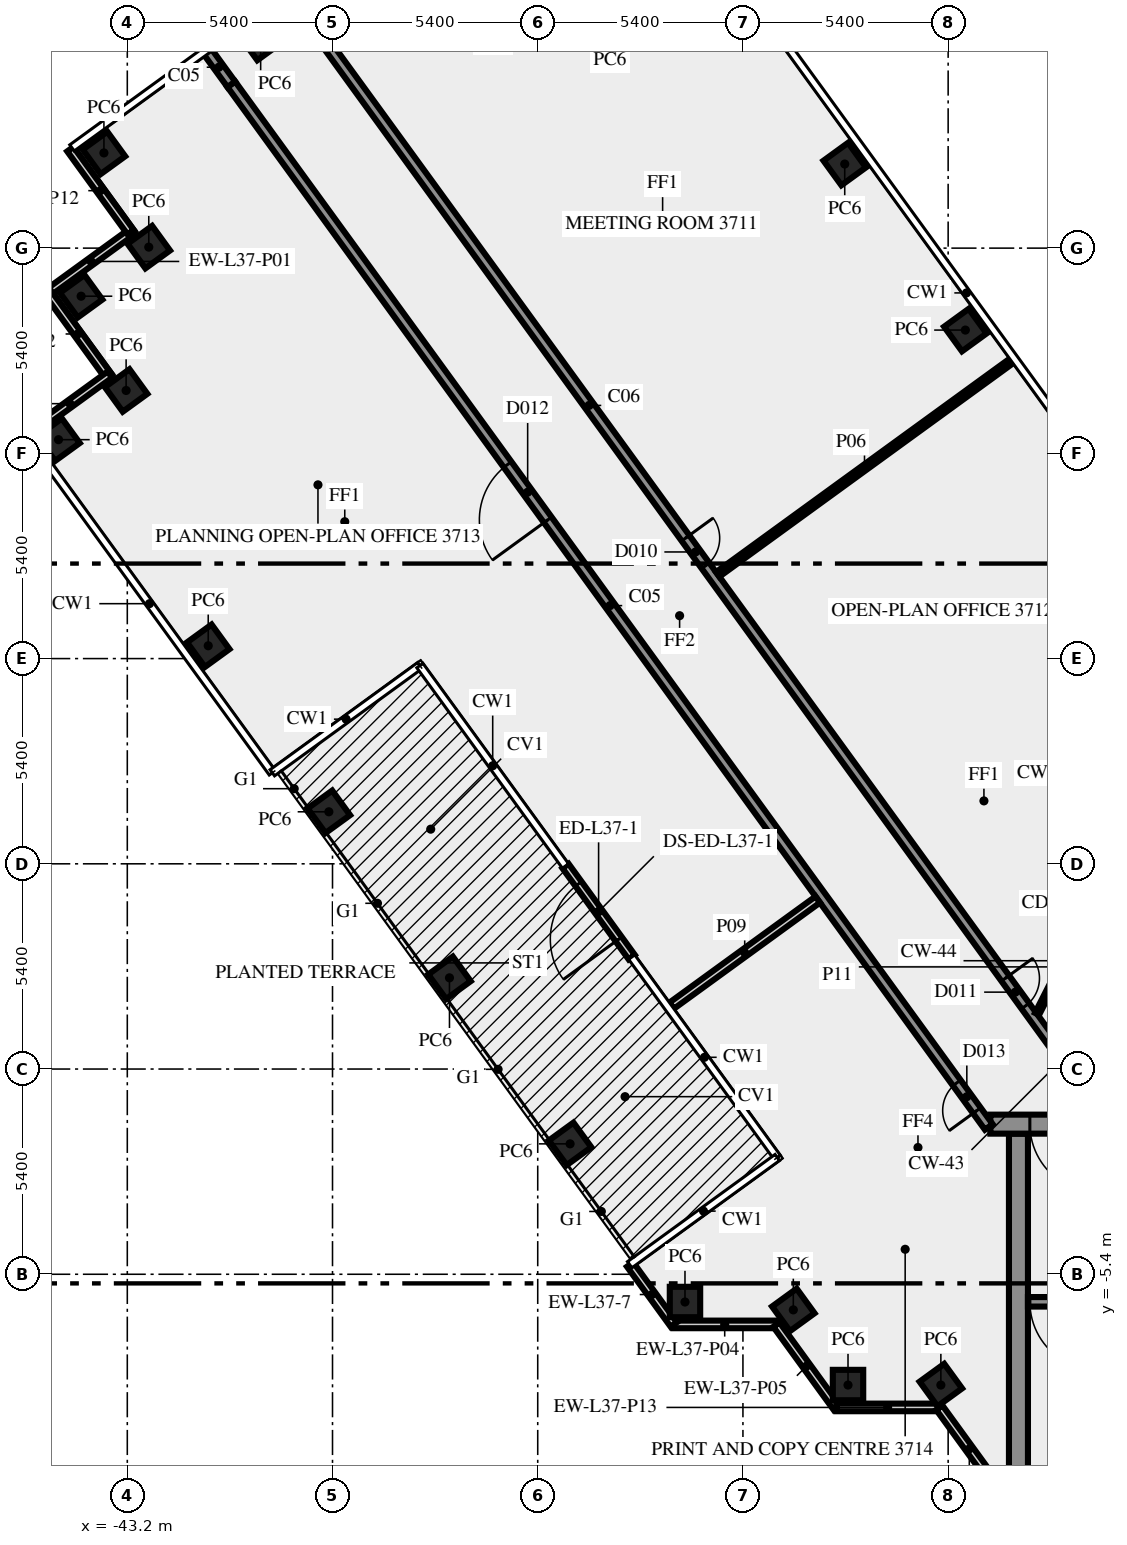
"""IFC4 building model, lengths in metres.
Left out: names, types, materials, properties, quantities, classifications, styles, units other than length and angle.
Written with IfcOpenShell. Run it as: python <this file> out.ifc"""

import sys

from ifc_helpers import new_model, si_unit, direction, frame, frame_2d, origin, origin_2d, place, context, subcontext, project, spatial, rectangle, extrude, element, fill, save


model = new_model("IFC4")
c1 = context("Model", 3, precision=1e-05, world=origin(), true_north=direction((0.0, 1.0)))
c2 = subcontext(c1, "Body", "Model", "MODEL_VIEW")
j1 = project(units=[si_unit("LENGTHUNIT", "METRE"), si_unit("PLANEANGLEUNIT", "RADIAN")], contexts=[c1])
p1 = place(None, origin())
s1 = spatial("IfcSite", under=j1, at=p1, CompositionType="ELEMENT")
p2 = place(p1, origin())
s2 = spatial("IfcBuilding", under=s1, at=p2, CompositionType="ELEMENT")
p3 = place(p2, frame((0.0, 0.0, 160.0)))
s3 = spatial("IfcBuildingStorey", under=s2, at=p3, CompositionType="ELEMENT", Elevation=160.0)
for number, where, z_axis, x_axis in (
    (1, (-21.147, 19.444, 0.0), (0.0, 0.0, 1.0), (-0.588, 0.809, 0.0)),
    (2, (-24.321, 23.812, 0.0), (0.0, 0.0, 1.0), (-0.588, 0.809, 0.0)),
    (3, (-39.691, 27.102, 0.0), (0.0, 0.0, 1.0), (-0.809, -0.588, 0.0)),
    (4, (-43.815, 24.105, 0.0), (0.0, 0.0, 1.0), (-0.809, -0.588, 0.0)),
    (5, (-42.635, 21.626, 0.0), (0.0, 0.0, 1.0), (-0.809, -0.588, 0.0)),
    (6, (-44.415, 20.335, 0.0), (0.0, 0.0, 1.0), (0.588, -0.809, 0.0)),
    (7, (-43.231, 17.854, 0.0), (0.0, 0.0, 1.0), (0.588, -0.809, 0.0)),
    (8, (-45.01, 16.56, 0.0), (0.0, 0.0, 1.0), (0.588, -0.809, 0.0)),
    (9, (-41.07, 11.137, 0.0), (0.0, 0.0, 1.0), (0.588, -0.809, 0.0)),
    (10, (-37.896, 6.769, 0.0), (0.0, 0.0, 1.0), (0.588, -0.809, 0.0)),
    (11, (-34.722, 2.4, 0.0), (0.0, 0.0, 1.0), (0.588, -0.809, 0.0)),
    (12, (-31.548, -1.969, 0.0), (0.0, 0.0, 1.0), (0.588, -0.809, 0.0)),
    (13, (-28.525, -6.13, 0.0), (0.0, 0.0, 1.0), (1.0, 0.0, 0.0)),
    (14, (-25.674, -6.337, 0.0), (0.0, 0.0, 1.0), (0.588, -0.809, 0.0)),
    (15, (-24.235, -8.315, 0.0), (0.0, 0.0, 1.0), (1.0, 0.0, 0.0)),
    (16, (-21.792, -8.315, 0.0), (0.0, 0.0, 1.0), (0.588, -0.809, 0.0)),
):
    element("IfcColumn", number, at=place(p3, frame(where, z_axis=z_axis, x_axis=x_axis)), inside=s3, PredefinedType="COLUMN", context=c2, shape_type="SweptSolid", body=[
        extrude(rectangle(XDim=0.8, YDim=0.8, at=origin_2d()), origin(), (0.0, 0.0, 1.0), 3.65),
    ])
for number, where, z_axis, x_axis in (
    (17, (-43.061, 22.043, 0.0), (0.0, 0.0, 1.0), (-0.809, -0.588, 0.0)),
    (18, (-45.296, 20.434, 0.0), (0.0, 0.0, 1.0), (0.588, -0.809, 0.0)),
):
    element("IfcWall", number, at=place(p3, frame(where, z_axis=z_axis, x_axis=x_axis)), inside=s3, PredefinedType="SOLIDWALL", context=c2, shape_type="SweptSolid", body=[
        extrude(rectangle(XDim=2.7, YDim=0.2, at=frame_2d((1.35, 0.0))), origin(), (0.0, 0.0, 1.0), 3.65),
    ])
p4 = place(p3, frame((-43.658, 18.272, 0.0), z_axis=(0.0, 0.0, 1.0), x_axis=(-0.808979656733, -0.587836639716, 0.0)))
e19 = element("IfcWall", 19, at=p4, inside=s3, PredefinedType="SOLIDWALL", context=c2, shape_type="SweptSolid", body=[
    extrude(rectangle(XDim=2.6, YDim=0.2, at=frame_2d((1.3, 0.0))), origin(), (0.0, 0.0, 1.0), 3.65),
])
p5 = place(p3, frame((-28.83, -6.719, 0.0), z_axis=(0.0, 0.0, 1.0), x_axis=(1.0, 0.0, 0.0)))
e20 = element("IfcWall", 20, at=p5, inside=s3, PredefinedType="SOLIDWALL", context=c2, shape_type="SweptSolid", body=[
    extrude(rectangle(XDim=2.7, YDim=0.2, at=frame_2d((1.35, 0.0))), origin(), (0.0, 0.0, 1.0), 3.65),
])
p6 = place(p3, frame((-26.12, -6.724, 0.0), z_axis=(0.0, 0.0, 1.0), x_axis=(0.587720002413, -0.809064397168, 0.0)))
e21 = element("IfcWall", 21, at=p6, inside=s3, PredefinedType="SOLIDWALL", context=c2, shape_type="SweptSolid", body=[
    extrude(rectangle(XDim=2.7, YDim=0.2, at=frame_2d((1.35, 0.0))), origin(), (0.0, 0.0, 1.0), 3.65),
])
p7 = place(p3, frame((-29.927, 2.946, 0.0), z_axis=(0.0, 0.0, 1.0), x_axis=(-0.58782869016, 0.808985433135, 0.0)))
e22 = element("IfcWall", 22, at=p7, inside=s3, PredefinedType="SOLIDWALL", context=c2, shape_type="SweptSolid", body=[
    extrude(rectangle(XDim=2.963, YDim=0.2, at=frame_2d((1.481, 0.0))), origin(), (0.0, 0.0, 1.0), 3.65),
])
p8 = place(p7, frame((0.582, 0.0, 0.0)))
e23 = element("IfcOpeningElement", 23, at=p8, cuts=e22, PredefinedType="OPENING", context=c2, shape_type="SweptSolid", body=[
    extrude(rectangle(XDim=1.8, YDim=2.4, at=frame_2d((0.9, 1.2))), frame((0.0, 0.11, 0.0), z_axis=(0.0, -1.0, 0.0), x_axis=(1.0, 0.0, 0.0)), (0.0, 0.0, 1.0), 0.22),
])
p9 = place(p3, frame((-29.969, -5.142, 0.0), z_axis=(0.0, 0.0, 1.0), x_axis=(0.587785613349, -0.809016732052, 0.0)))
e24 = element("IfcWall", 24, at=p9, inside=s3, PredefinedType="SOLIDWALL", context=c2, shape_type="SweptSolid", body=[
    extrude(rectangle(XDim=1.956, YDim=0.2, at=frame_2d((0.978, 0.0))), origin(), (0.0, 0.0, 1.0), 3.65),
])
for number, where, z_axis, x_axis in (
    (25, (-44.699, 24.205, 0.0), (0.0, 0.0, 1.0), (0.588, -0.809, 0.0)),
    (26, (-24.543, -8.904, 0.0), (0.0, 0.0, 1.0), (1.0, 0.0, 0.0)),
):
    element("IfcWall", number, at=place(p3, frame(where, z_axis=z_axis, x_axis=x_axis)), inside=s3, PredefinedType="SOLIDWALL", context=c2, shape_type="SweptSolid", body=[
        extrude(rectangle(XDim=2.7, YDim=0.2, at=frame_2d((1.35, 0.0))), origin(), (0.0, 0.0, 1.0), 3.65),
    ])
p10 = place(p3, frame((-21.833, -8.909, 0.0), z_axis=(0.0, 0.0, 1.0), x_axis=(0.587766567315, -0.809030569476, 0.0)))
e27 = element("IfcWall", 27, at=p10, inside=s3, PredefinedType="SOLIDWALL", context=c2, shape_type="SweptSolid", body=[
    extrude(rectangle(XDim=2.688, YDim=0.2, at=frame_2d((1.344, 0.0))), origin(), (0.0, 0.0, 1.0), 3.65),
])
p11 = place(p3, frame((-19.75, -10.5, 0.0), z_axis=(0.0, 0.0, 1.0), x_axis=(0.0, 1.0, 0.0)))
e28 = element("IfcWall", 28, at=p11, inside=s3, PredefinedType="SHEAR", context=c2, shape_type="SweptSolid", body=[
    extrude(rectangle(XDim=8.8, YDim=0.5, at=frame_2d((4.4, 0.0))), origin(), (0.0, 0.0, 1.0), 3.65),
])
p12 = place(p3, frame((-11.45, -6.125, 0.0), z_axis=(0.0, 0.0, 1.0), x_axis=(-1.0, 0.0, 0.0)))
e29 = element("IfcWall", 29, at=p12, inside=s3, PredefinedType="SHEAR", context=c2, shape_type="SweptSolid", body=[
    extrude(rectangle(XDim=8.05, YDim=0.25, at=frame_2d((4.025, 0.0))), origin(), (0.0, 0.0, 1.0), 3.65),
])
p13 = place(p12, frame((6.2, 0.0, 0.0)))
e30 = element("IfcOpeningElement", 30, at=p13, cuts=e29, PredefinedType="OPENING", context=c2, shape_type="SweptSolid", body=[
    extrude(rectangle(XDim=1.8, YDim=2.1, at=frame_2d((0.9, 1.05))), frame((0.0, 0.135, 0.0), z_axis=(0.0, -1.0, 0.0), x_axis=(1.0, 0.0, 0.0)), (0.0, 0.0, 1.0), 0.27),
])
p14 = place(p3, frame((20.49, -1.45, 0.0), z_axis=(0.0, 0.0, 1.0), x_axis=(-1.0, 0.0, 0.0)))
e31 = element("IfcWall", 31, at=p14, inside=s3, PredefinedType="SHEAR", context=c2, shape_type="SweptSolid", body=[
    extrude(rectangle(XDim=40.98, YDim=0.5, at=frame_2d((20.49, 0.0))), origin(), (0.0, 0.0, 1.0), 3.65),
])
p15 = place(p14, frame((38.14, 0.0, 0.0)))
e32 = element("IfcOpeningElement", 32, at=p15, cuts=e31, PredefinedType="OPENING", context=c2, shape_type="SweptSolid", body=[
    extrude(rectangle(XDim=1.8, YDim=2.1, at=frame_2d((0.9, 1.05))), frame((0.0, 0.26, 0.0), z_axis=(0.0, -1.0, 0.0), x_axis=(1.0, 0.0, 0.0)), (0.0, 0.0, 1.0), 0.52),
])
p16 = place(p14, frame((35.89, 0.0, 0.0)))
e33 = element("IfcOpeningElement", 33, at=p16, cuts=e31, PredefinedType="OPENING", context=c2, shape_type="SweptSolid", body=[
    extrude(rectangle(XDim=0.9, YDim=2.1, at=frame_2d((0.45, 1.05))), frame((0.0, 0.26, 0.0), z_axis=(0.0, -1.0, 0.0), x_axis=(1.0, 0.0, 0.0)), (0.0, 0.0, 1.0), 0.52),
])
p17 = place(p14, frame((32.94, 0.0, 0.0)))
e34 = element("IfcOpeningElement", 34, at=p17, cuts=e31, PredefinedType="OPENING", context=c2, shape_type="SweptSolid", body=[
    extrude(rectangle(XDim=0.9, YDim=2.1, at=frame_2d((0.45, 1.05))), frame((0.0, 0.26, 0.0), z_axis=(0.0, -1.0, 0.0), x_axis=(1.0, 0.0, 0.0)), (0.0, 0.0, 1.0), 0.52),
])
p18 = place(p14, frame((28.802, 0.0, 0.0)))
e35 = element("IfcOpeningElement", 35, at=p18, cuts=e31, PredefinedType="OPENING", context=c2, shape_type="SweptSolid", body=[
    extrude(rectangle(XDim=0.9, YDim=2.1, at=frame_2d((0.45, 1.05))), frame((0.0, 0.26, 0.0), z_axis=(0.0, -1.0, 0.0), x_axis=(1.0, 0.0, 0.0)), (0.0, 0.0, 1.0), 0.52),
])
p19 = place(p14, frame((25.077, 0.0, 0.0)))
e36 = element("IfcOpeningElement", 36, at=p19, cuts=e31, PredefinedType="OPENING", context=c2, shape_type="SweptSolid", body=[
    extrude(rectangle(XDim=0.9, YDim=2.1, at=frame_2d((0.45, 1.05))), frame((0.0, 0.26, 0.0), z_axis=(0.0, -1.0, 0.0), x_axis=(1.0, 0.0, 0.0)), (0.0, 0.0, 1.0), 0.52),
])
p20 = place(p14, frame((21.765, 0.0, 0.0)))
e37 = element("IfcOpeningElement", 37, at=p20, cuts=e31, PredefinedType="OPENING", context=c2, shape_type="SweptSolid", body=[
    extrude(rectangle(XDim=2.0, YDim=2.1, at=frame_2d((1.0, 1.05))), frame((0.0, 0.26, 0.0), z_axis=(0.0, -1.0, 0.0), x_axis=(1.0, 0.0, 0.0)), (0.0, 0.0, 1.0), 0.52),
])
p21 = place(p14, frame((7.14, 0.0, 0.0)))
e38 = element("IfcOpeningElement", 38, at=p21, cuts=e31, PredefinedType="OPENING", context=c2, shape_type="SweptSolid", body=[
    extrude(rectangle(XDim=0.9, YDim=2.1, at=frame_2d((0.45, 1.05))), frame((0.0, 0.26, 0.0), z_axis=(0.0, -1.0, 0.0), x_axis=(1.0, 0.0, 0.0)), (0.0, 0.0, 1.0), 0.52),
])
p22 = place(p14, frame((5.028, 0.0, 0.0)))
e39 = element("IfcOpeningElement", 39, at=p22, cuts=e31, PredefinedType="OPENING", context=c2, shape_type="SweptSolid", body=[
    extrude(rectangle(XDim=0.8, YDim=2.1, at=frame_2d((0.4, 1.05))), frame((0.0, 0.26, 0.0), z_axis=(0.0, -1.0, 0.0), x_axis=(1.0, 0.0, 0.0)), (0.0, 0.0, 1.0), 0.52),
])
p23 = place(p14, frame((3.452, 0.0, 0.0)))
e40 = element("IfcOpeningElement", 40, at=p23, cuts=e31, PredefinedType="OPENING", context=c2, shape_type="SweptSolid", body=[
    extrude(rectangle(XDim=0.8, YDim=2.1, at=frame_2d((0.4, 1.05))), frame((0.0, 0.26, 0.0), z_axis=(0.0, -1.0, 0.0), x_axis=(1.0, 0.0, 0.0)), (0.0, 0.0, 1.0), 0.52),
])
p24 = place(p14, frame((1.04, 0.0, 0.0)))
e41 = element("IfcOpeningElement", 41, at=p24, cuts=e31, PredefinedType="OPENING", context=c2, shape_type="SweptSolid", body=[
    extrude(rectangle(XDim=1.8, YDim=2.1, at=frame_2d((0.9, 1.05))), frame((0.0, 0.26, 0.0), z_axis=(0.0, -1.0, 0.0), x_axis=(1.0, 0.0, 0.0)), (0.0, 0.0, 1.0), 0.52),
])
p25 = place(p3, frame((-20.531, -1.523, 0.0), z_axis=(0.0, 0.0, 1.0), x_axis=(-0.587781654618, 0.809019608226, 0.0)))
e42 = element("IfcWall", 42, at=p25, inside=s3, PredefinedType="SOLIDWALL", context=c2, shape_type="SweptSolid", body=[
    extrude(rectangle(XDim=33.911, YDim=0.25, at=frame_2d((16.956, 0.0))), origin(), (0.0, 0.0, 1.0), 3.65),
])
p26 = place(p25, frame((19.743, 0.0, 0.0)))
e43 = element("IfcOpeningElement", 43, at=p26, cuts=e42, PredefinedType="OPENING", context=c2, shape_type="SweptSolid", body=[
    extrude(rectangle(XDim=1.8, YDim=2.1, at=frame_2d((0.9, 1.05))), frame((0.0, 0.135, 0.0), z_axis=(0.0, -1.0, 0.0), x_axis=(1.0, 0.0, 0.0)), (0.0, 0.0, 1.0), 0.27),
])
p27 = place(p25, frame((0.533, 0.0, 0.0)))
e44 = element("IfcOpeningElement", 44, at=p27, cuts=e42, PredefinedType="OPENING", context=c2, shape_type="SweptSolid", body=[
    extrude(rectangle(XDim=0.9, YDim=2.1, at=frame_2d((0.45, 1.05))), frame((0.0, 0.135, 0.0), z_axis=(0.0, -1.0, 0.0), x_axis=(1.0, 0.0, 0.0)), (0.0, 0.0, 1.0), 0.27),
])
p28 = place(p3, frame((-38.32, 27.469, 0.0), z_axis=(0.0, 0.0, 1.0), x_axis=(0.587788021768, -0.809014982226, 0.0)))
e45 = element("IfcWall", 45, at=p28, inside=s3, PredefinedType="SOLIDWALL", context=c2, shape_type="SweptSolid", body=[
    extrude(rectangle(XDim=35.344, YDim=0.25, at=frame_2d((17.672, 0.0))), origin(), (0.0, 0.0, 1.0), 3.65),
])
p29 = place(p28, frame((31.003, 0.0, 0.0)))
e46 = element("IfcOpeningElement", 46, at=p29, cuts=e45, PredefinedType="OPENING", context=c2, shape_type="SweptSolid", body=[
    extrude(rectangle(XDim=0.9, YDim=2.1, at=frame_2d((0.45, 1.05))), frame((0.0, 0.135, 0.0), z_axis=(0.0, -1.0, 0.0), x_axis=(1.0, 0.0, 0.0)), (0.0, 0.0, 1.0), 0.27),
])
p30 = place(p28, frame((16.687, 0.0, 0.0)))
e47 = element("IfcOpeningElement", 47, at=p30, cuts=e45, PredefinedType="OPENING", context=c2, shape_type="SweptSolid", body=[
    extrude(rectangle(XDim=0.9, YDim=2.1, at=frame_2d((0.45, 1.05))), frame((0.0, 0.135, 0.0), z_axis=(0.0, -1.0, 0.0), x_axis=(1.0, 0.0, 0.0)), (0.0, 0.0, 1.0), 0.27),
])
p31 = place(p3, frame((-19.938, 18.629, 0.0), z_axis=(0.0, 0.0, 1.0), x_axis=(-0.80900684162, -0.587799226107, 0.0)))
e48 = element("IfcWall", 48, at=p31, inside=s3, PredefinedType="PARTITIONING", context=c2, shape_type="SweptSolid", body=[
    extrude(rectangle(XDim=9.55, YDim=0.15, at=frame_2d((4.775, 0.0))), origin(), (0.0, 0.0, 1.0), 2.85),
])
p32 = place(p3, frame((-28.875, 1.667, 0.0), z_axis=(0.0, 0.0, 1.0), x_axis=(0.80907155287, 0.587710151637, 0.0)))
e49 = element("IfcWall", 49, at=p32, inside=s3, PredefinedType="SOLIDWALL", context=c2, shape_type="SweptSolid", body=[
    extrude(rectangle(XDim=4.75, YDim=0.2, at=frame_2d((2.375, 0.0))), origin(), (0.0, 0.0, 1.0), 3.65),
])
p33 = place(p3, frame((-19.261, 1.45, 0.0), z_axis=(0.0, 0.0, 1.0), x_axis=(0.453950796792, 0.891026752736, 0.0)))
e50 = element("IfcWall", 50, at=p33, inside=s3, PredefinedType="PARTITIONING", context=c2, shape_type="SweptSolid", body=[
    extrude(rectangle(XDim=2.778, YDim=0.12, at=frame_2d((1.389, 0.0))), origin(), (0.0, 0.0, 1.0), 3.65),
])
p34 = place(p3, frame((-40.463, 25.911, 0.0), z_axis=(0.0, 0.0, 1.0), x_axis=(-0.587792454268, 0.809011761785, 0.0)))
e51 = element("IfcWall", 51, at=p34, inside=s3, PredefinedType="SOLIDWALL", context=c2, shape_type="SweptSolid", body=[
    extrude(rectangle(XDim=1.11, YDim=0.25, at=frame_2d((0.555, 0.0))), origin(), (0.0, 0.0, 1.0), 2.85),
])
p35 = place(p8, origin())
e52 = element("IfcDoor", 52, at=p35, inside=s3, OperationType="DOUBLE_DOOR_SINGLE_SWING", PredefinedType="DOOR", context=c2, shape_type="SweptSolid", body=[
    extrude(rectangle(XDim=1.8, YDim=2.4, at=frame_2d((0.9, 1.2))), frame((0.0, 0.025, 0.0), z_axis=(0.0, -1.0, 0.0), x_axis=(1.0, 0.0, 0.0)), (0.0, 0.0, 1.0), 0.05),
])
fill(e23, e52)
p36 = place(p13, origin())
e53 = element("IfcDoor", 53, at=p36, inside=s3, OperationType="DOUBLE_DOOR_SINGLE_SWING", PredefinedType="DOOR", context=c2, shape_type="SweptSolid", body=[
    extrude(rectangle(XDim=1.8, YDim=2.1, at=frame_2d((0.9, 1.05))), frame((0.0, 0.025, 0.0), z_axis=(0.0, -1.0, 0.0), x_axis=(1.0, 0.0, 0.0)), (0.0, 0.0, 1.0), 0.05),
])
fill(e30, e53)
p37 = place(p15, origin())
e54 = element("IfcDoor", 54, at=p37, inside=s3, OperationType="DOUBLE_DOOR_SINGLE_SWING", PredefinedType="DOOR", context=c2, shape_type="SweptSolid", body=[
    extrude(rectangle(XDim=1.8, YDim=2.1, at=frame_2d((0.9, 1.05))), frame((0.0, 0.025, 0.0), z_axis=(0.0, -1.0, 0.0), x_axis=(1.0, 0.0, 0.0)), (0.0, 0.0, 1.0), 0.05),
])
fill(e32, e54)
p38 = place(p29, origin())
e55 = element("IfcDoor", 55, at=p38, inside=s3, OperationType="SINGLE_SWING_RIGHT", PredefinedType="DOOR", context=c2, shape_type="SweptSolid", body=[
    extrude(rectangle(XDim=0.9, YDim=2.1, at=frame_2d((0.45, 1.05))), frame((0.0, 0.025, 0.0), z_axis=(0.0, -1.0, 0.0), x_axis=(1.0, 0.0, 0.0)), (0.0, 0.0, 1.0), 0.05),
])
fill(e46, e55)
p39 = place(p30, origin())
e56 = element("IfcDoor", 56, at=p39, inside=s3, OperationType="SINGLE_SWING_RIGHT", PredefinedType="DOOR", context=c2, shape_type="SweptSolid", body=[
    extrude(rectangle(XDim=0.9, YDim=2.1, at=frame_2d((0.45, 1.05))), frame((0.0, 0.025, 0.0), z_axis=(0.0, -1.0, 0.0), x_axis=(1.0, 0.0, 0.0)), (0.0, 0.0, 1.0), 0.05),
])
fill(e47, e56)
p40 = place(p26, origin())
e57 = element("IfcDoor", 57, at=p40, inside=s3, OperationType="DOUBLE_DOOR_SINGLE_SWING", PredefinedType="DOOR", context=c2, shape_type="SweptSolid", body=[
    extrude(rectangle(XDim=1.8, YDim=2.1, at=frame_2d((0.9, 1.05))), frame((0.0, 0.025, 0.0), z_axis=(0.0, -1.0, 0.0), x_axis=(1.0, 0.0, 0.0)), (0.0, 0.0, 1.0), 0.05),
])
fill(e43, e57)
p41 = place(p27, origin())
e58 = element("IfcDoor", 58, at=p41, inside=s3, OperationType="SINGLE_SWING_LEFT", PredefinedType="DOOR", context=c2, shape_type="SweptSolid", body=[
    extrude(rectangle(XDim=0.9, YDim=2.1, at=frame_2d((0.45, 1.05))), frame((0.0, 0.025, 0.0), z_axis=(0.0, -1.0, 0.0), x_axis=(1.0, 0.0, 0.0)), (0.0, 0.0, 1.0), 0.05),
])
fill(e44, e58)
save(model, sys.argv[1])
